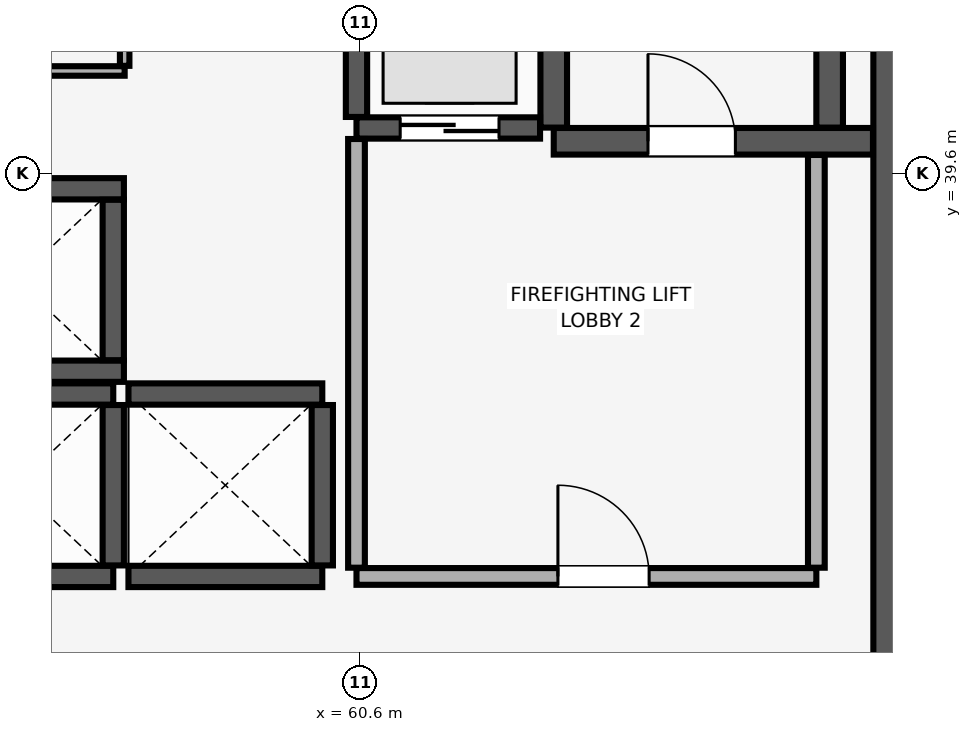
"""IFC4 building model, lengths in metres.
Left out: names, types, materials, properties, quantities, classifications, styles, units other than length and angle.
Written with IfcOpenShell. Run it as: python <this file> out.ifc"""

import sys

from ifc_helpers import new_model, si_unit, direction, frame, frame_2d, origin, place, context, subcontext, project, spatial, rectangle, extrude, element, fill, save


model = new_model("IFC4")
c1 = context("Model", 3, precision=1e-05, world=origin(), true_north=direction((0.0, 1.0)))
c2 = subcontext(c1, "Body", "Model", "MODEL_VIEW")
j1 = project(units=[si_unit("LENGTHUNIT", "METRE"), si_unit("PLANEANGLEUNIT", "RADIAN")], contexts=[c1])
p1 = place(None, origin())
s1 = spatial("IfcSite", under=j1, at=p1, CompositionType="ELEMENT")
p2 = place(p1, origin())
s2 = spatial("IfcBuilding", under=s1, at=p2, CompositionType="ELEMENT")
p3 = place(p2, frame((0.0, 0.0, 130.55)))
s3 = spatial("IfcBuildingStorey", under=s2, at=p3, CompositionType="ELEMENT", Elevation=130.55)
p4 = place(p3, frame((67.8, 29.4, 0.0), z_axis=(0.0, 0.0, 1.0), x_axis=(0.0, 1.0, 0.0)))
e1 = element("IfcWall", 1, at=p4, inside=s3, PredefinedType="SHEAR", context=c2, shape_type="SweptSolid", body=[
    extrude(rectangle(XDim=19.2, YDim=0.9, at=frame_2d((9.6, 0.0))), origin(), (0.0, 0.0, 1.0), 4.52),
])
p5 = place(p3, frame((63.145, 40.025, 0.0), z_axis=(0.0, 0.0, 1.0), x_axis=(1.0, 0.0, 0.0)))
e2 = element("IfcWall", 2, at=p5, inside=s3, PredefinedType="SHEAR", context=c2, shape_type="SweptSolid", body=[
    extrude(rectangle(XDim=4.2, YDim=0.35, at=frame_2d((2.1, 0.0))), origin(), (0.0, 0.0, 1.0), 4.52),
])
p6 = place(p5, frame((1.24, 0.0, 0.0)))
e3 = element("IfcOpeningElement", 3, at=p6, cuts=e2, PredefinedType="OPENING", context=c2, shape_type="SweptSolid", body=[
    extrude(rectangle(XDim=1.15, YDim=2.15, at=frame_2d((0.575, 1.075))), frame((0.0, 0.185, 0.0), z_axis=(0.0, -1.0, 0.0), x_axis=(1.0, 0.0, 0.0)), (0.0, 0.0, 1.0), 0.37),
])
for number, where, z_axis, x_axis in (
    (4, (63.145, 40.205, 0.0), (0.0, 0.0, 1.0), (0.0, 1.0, 0.0)),
    (5, (66.775, 40.205, 0.0), (0.0, 0.0, 1.0), (0.0, 1.0, 0.0)),
):
    element("IfcWall", number, at=place(p3, frame(where, z_axis=z_axis, x_axis=x_axis)), inside=s3, PredefinedType="SHEAR", context=c2, shape_type="SweptSolid", body=[
        extrude(rectangle(XDim=8.09, YDim=0.35, at=frame_2d((4.045, 0.0))), origin(), (0.0, 0.0, 1.0), 4.52),
    ])
for number, where, z_axis, x_axis in (
    (6, (54.8, 34.3, 0.0), (0.0, 0.0, 1.0), (1.0, 0.0, 0.0)),
    (7, (54.8, 36.7, 0.0), (0.0, 0.0, 1.0), (1.0, 0.0, 0.0)),
):
    element("IfcWall", number, at=place(p3, frame(where, z_axis=z_axis, x_axis=x_axis)), inside=s3, PredefinedType="SHEAR", context=c2, shape_type="SweptSolid", body=[
        extrude(rectangle(XDim=2.55, YDim=0.28, at=frame_2d((1.275, 0.0))), origin(), (0.0, 0.0, 1.0), 4.52),
    ])
p7 = place(p3, frame((57.35, 34.445, 0.0), z_axis=(0.0, 0.0, 1.0), x_axis=(0.0, 1.0, 0.0)))
e8 = element("IfcWall", 8, at=p7, inside=s3, PredefinedType="SHEAR", context=c2, shape_type="SweptSolid", body=[
    extrude(rectangle(XDim=2.11, YDim=0.28, at=frame_2d((1.055, 0.0))), origin(), (0.0, 0.0, 1.0), 4.52),
])
for number, where, z_axis, x_axis in (
    (9, (57.55, 34.3, 0.0), (0.0, 0.0, 1.0), (1.0, 0.0, 0.0)),
    (10, (57.55, 36.7, 0.0), (0.0, 0.0, 1.0), (1.0, 0.0, 0.0)),
):
    element("IfcWall", number, at=place(p3, frame(where, z_axis=z_axis, x_axis=x_axis)), inside=s3, PredefinedType="SHEAR", context=c2, shape_type="SweptSolid", body=[
        extrude(rectangle(XDim=2.55, YDim=0.28, at=frame_2d((1.275, 0.0))), origin(), (0.0, 0.0, 1.0), 4.52),
    ])
p8 = place(p3, frame((60.1, 34.445, 0.0), z_axis=(0.0, 0.0, 1.0), x_axis=(0.0, 1.0, 0.0)))
e11 = element("IfcWall", 11, at=p8, inside=s3, PredefinedType="SHEAR", context=c2, shape_type="SweptSolid", body=[
    extrude(rectangle(XDim=2.11, YDim=0.28, at=frame_2d((1.055, 0.0))), origin(), (0.0, 0.0, 1.0), 4.52),
])
for number, where, z_axis, x_axis in (
    (12, (54.66, 37.0, 0.0), (0.0, 0.0, 1.0), (1.0, 0.0, 0.0)),
    (13, (54.66, 39.4, 0.0), (0.0, 0.0, 1.0), (1.0, 0.0, 0.0)),
):
    element("IfcWall", number, at=place(p3, frame(where, z_axis=z_axis, x_axis=x_axis)), inside=s3, PredefinedType="SHEAR", context=c2, shape_type="SweptSolid", body=[
        extrude(rectangle(XDim=2.83, YDim=0.28, at=frame_2d((1.415, 0.0))), origin(), (0.0, 0.0, 1.0), 4.52),
    ])
p9 = place(p3, frame((57.35, 37.145, 0.0), z_axis=(0.0, 0.0, 1.0), x_axis=(0.0, 1.0, 0.0)))
e14 = element("IfcWall", 14, at=p9, inside=s3, PredefinedType="SHEAR", context=c2, shape_type="SweptSolid", body=[
    extrude(rectangle(XDim=2.11, YDim=0.28, at=frame_2d((1.055, 0.0))), origin(), (0.0, 0.0, 1.0), 4.52),
])
p10 = place(p3, frame((60.55, 40.2, 0.0), z_axis=(0.0, 0.0, 1.0), x_axis=(1.0, 0.0, 0.0)))
e15 = element("IfcWall", 15, at=p10, inside=s3, PredefinedType="SHEAR", context=c2, shape_type="SweptSolid", body=[
    extrude(rectangle(XDim=2.415, YDim=0.28, at=frame_2d((1.208, 0.0))), origin(), (0.0, 0.0, 1.0), 4.52),
])
p11 = place(p10, frame((0.575, 0.0, 0.0)))
e16 = element("IfcOpeningElement", 16, at=p11, cuts=e15, PredefinedType="OPENING", context=c2, shape_type="SweptSolid", body=[
    extrude(rectangle(XDim=1.3, YDim=2.3, at=frame_2d((0.65, 1.15))), frame((0.0, 0.15, 0.0), z_axis=(0.0, -1.0, 0.0), x_axis=(1.0, 0.0, 0.0)), (0.0, 0.0, 1.0), 0.3),
])
p12 = place(p3, frame((60.55, 40.345, 0.0), z_axis=(0.0, 0.0, 1.0), x_axis=(0.0, 1.0, 0.0)))
e17 = element("IfcWall", 17, at=p12, inside=s3, PredefinedType="SHEAR", context=c2, shape_type="SweptSolid", body=[
    extrude(rectangle(XDim=2.81, YDim=0.28, at=frame_2d((1.405, 0.0))), origin(), (0.0, 0.0, 1.0), 4.52),
])
p13 = place(p3, frame((60.55, 34.3, 0.0), z_axis=(0.0, 0.0, 1.0), x_axis=(1.0, 0.0, 0.0)))
e18 = element("IfcWall", 18, at=p13, inside=s3, PredefinedType="PARTITIONING", context=c2, shape_type="SweptSolid", body=[
    extrude(rectangle(XDim=6.05, YDim=0.22, at=frame_2d((3.025, 0.0))), origin(), (0.0, 0.0, 1.0), 4.52),
])
p14 = place(p13, frame((2.65, 0.0, 0.0)))
e19 = element("IfcOpeningElement", 19, at=p14, cuts=e18, PredefinedType="OPENING", context=c2, shape_type="SweptSolid", body=[
    extrude(rectangle(XDim=1.2, YDim=2.15, at=frame_2d((0.6, 1.075))), frame((0.0, 0.12, 0.0), z_axis=(0.0, -1.0, 0.0), x_axis=(1.0, 0.0, 0.0)), (0.0, 0.0, 1.0), 0.24),
])
p15 = place(p3, frame((60.55, 34.415, 0.0), z_axis=(0.0, 0.0, 1.0), x_axis=(0.0, 1.0, 0.0)))
e20 = element("IfcWall", 20, at=p15, inside=s3, PredefinedType="PARTITIONING", context=c2, shape_type="SweptSolid", body=[
    extrude(rectangle(XDim=5.64, YDim=0.22, at=frame_2d((2.82, 0.0))), origin(), (0.0, 0.0, 1.0), 4.52),
])
p16 = place(p3, frame((66.6, 34.415, 0.0), z_axis=(0.0, 0.0, 1.0), x_axis=(0.0, 1.0, 0.0)))
e21 = element("IfcWall", 21, at=p16, inside=s3, PredefinedType="PARTITIONING", context=c2, shape_type="SweptSolid", body=[
    extrude(rectangle(XDim=5.43, YDim=0.22, at=frame_2d((2.715, 0.0))), origin(), (0.0, 0.0, 1.0), 4.52),
])
p17 = place(p3, frame((52.468, 40.95, 0.0), z_axis=(0.0, 0.0, 1.0), x_axis=(1.0, 0.0, 0.0)))
e22 = element("IfcWall", 22, at=p17, inside=s3, PredefinedType="PARTITIONING", context=c2, shape_type="SweptSolid", body=[
    extrude(rectangle(XDim=5.032, YDim=0.125, at=frame_2d((2.516, 0.0))), origin(), (0.0, 0.0, 1.0), 4.52),
])
p18 = place(p17, frame((2.032, 0.0, 0.0)))
e23 = element("IfcOpeningElement", 23, at=p18, cuts=e22, PredefinedType="OPENING", context=c2, shape_type="SweptSolid", body=[
    extrude(rectangle(XDim=0.9, YDim=2.1, at=frame_2d((0.45, 1.05))), frame((0.0, 0.073, 0.0), z_axis=(0.0, -1.0, 0.0), x_axis=(1.0, 0.0, 0.0)), (0.0, 0.0, 1.0), 0.145),
])
p19 = place(p3, frame((57.5, 41.018, 0.0), z_axis=(0.0, 0.0, 1.0), x_axis=(0.0, 1.0, 0.0)))
e24 = element("IfcWall", 24, at=p19, inside=s3, PredefinedType="PARTITIONING", context=c2, shape_type="SweptSolid", body=[
    extrude(rectangle(XDim=2.167, YDim=0.125, at=frame_2d((1.084, 0.0))), origin(), (0.0, 0.0, 1.0), 4.52),
])
p20 = place(p6, origin())
e25 = element("IfcDoor", 25, at=p20, inside=s3, OperationType="SINGLE_SWING_LEFT", PredefinedType="DOOR", context=c2, shape_type="SweptSolid", body=[
    extrude(rectangle(XDim=1.15, YDim=2.15, at=frame_2d((0.575, 1.075))), frame((0.0, 0.025, 0.0), z_axis=(0.0, -1.0, 0.0), x_axis=(1.0, 0.0, 0.0)), (0.0, 0.0, 1.0), 0.05),
])
fill(e3, e25)
p21 = place(p11, origin())
e26 = element("IfcDoor", 26, at=p21, inside=s3, OperationType="DOUBLE_DOOR_SLIDING", PredefinedType="DOOR", context=c2, shape_type="SweptSolid", body=[
    extrude(rectangle(XDim=1.3, YDim=2.3, at=frame_2d((0.65, 1.15))), frame((0.0, 0.025, 0.0), z_axis=(0.0, -1.0, 0.0), x_axis=(1.0, 0.0, 0.0)), (0.0, 0.0, 1.0), 0.05),
])
fill(e16, e26)
p22 = place(p14, origin())
e27 = element("IfcDoor", 27, at=p22, inside=s3, OperationType="SINGLE_SWING_LEFT", PredefinedType="DOOR", context=c2, shape_type="SweptSolid", body=[
    extrude(rectangle(XDim=1.2, YDim=2.15, at=frame_2d((0.6, 1.075))), frame((0.0, 0.025, 0.0), z_axis=(0.0, -1.0, 0.0), x_axis=(1.0, 0.0, 0.0)), (0.0, 0.0, 1.0), 0.05),
])
fill(e19, e27)
save(model, sys.argv[1])
